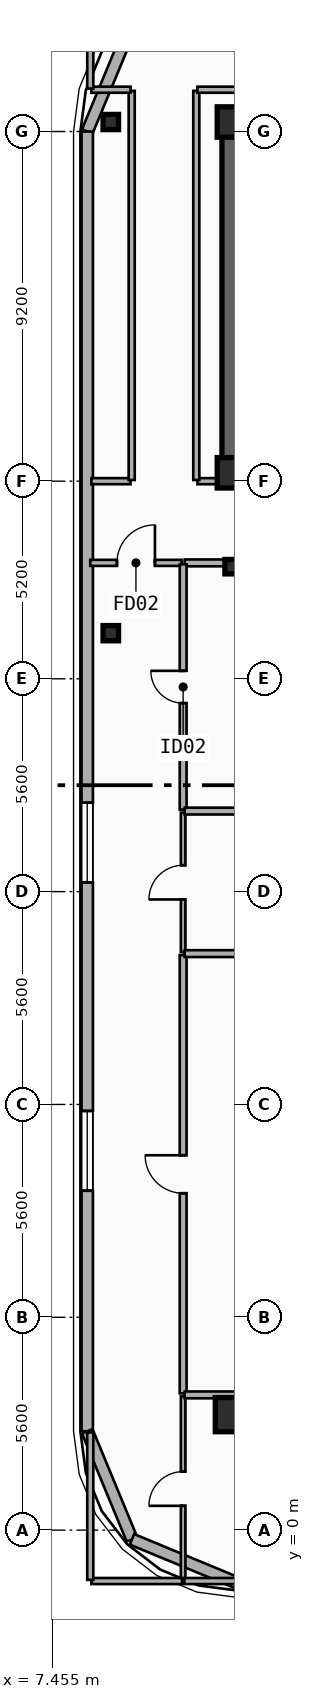
"""IFC4 building model, lengths in metres.
Left out: names, types, materials, properties, quantities, classifications, styles, units other than length and angle.
Written with IfcOpenShell. Run it as: python <this file> out.ifc"""

import sys

from ifc_helpers import new_model, si_unit, direction, frame, frame_2d, origin, origin_2d, place, context, subcontext, project, spatial, rectangle, i_section, extrude, element, fill, save


model = new_model("IFC4")
c1 = context("Model", 3, precision=1e-05, world=origin(), true_north=direction((0.0, 1.0)))
c2 = subcontext(c1, "Body", "Model", "MODEL_VIEW")
j1 = project(units=[si_unit("LENGTHUNIT", "METRE"), si_unit("PLANEANGLEUNIT", "RADIAN")], contexts=[c1])
p1 = place(None, origin())
s1 = spatial("IfcSite", under=j1, at=p1, CompositionType="ELEMENT")
p2 = place(p1, origin())
s2 = spatial("IfcBuilding", under=s1, at=p2, CompositionType="ELEMENT")
p3 = place(p2, frame((0.0, 0.0, 254.7)))
s3 = spatial("IfcBuildingStorey", under=s2, at=p3, CompositionType="ELEMENT", Elevation=254.7)
p4 = place(p3, frame((12.15, 37.05, 0.0), z_axis=(0.0, 0.0, 1.0), x_axis=(1.0, 0.0, 0.0)))
e1 = element("IfcWall", 1, at=p4, inside=s3, PredefinedType="SHEAR", context=c2, shape_type="SweptSolid", body=[
    extrude(rectangle(XDim=33.23, YDim=0.45, at=frame_2d((16.615, 0.0))), origin(), (0.0, 0.0, 1.0), 3.7),
])
p5 = place(p3, frame((21.18, 27.82, 0.0), z_axis=(0.0, 0.0, 1.0), x_axis=(-1.0, 0.0, 0.0)))
e2 = element("IfcWall", 2, at=p5, inside=s3, PredefinedType="SHEAR", context=c2, shape_type="SweptSolid", body=[
    extrude(rectangle(XDim=9.03, YDim=0.45, at=frame_2d((4.515, 0.0))), origin(), (0.0, 0.0, 1.0), 3.7),
])
p6 = place(p5, frame((2.68, 0.0, 0.0)))
e3 = element("IfcOpeningElement", 3, at=p6, cuts=e2, PredefinedType="OPENING", context=c2, shape_type="SweptSolid", body=[
    extrude(rectangle(XDim=1.1, YDim=2.15, at=frame_2d((0.55, 1.075))), frame((0.0, 0.235, 0.0), z_axis=(0.0, -1.0, 0.0), x_axis=(1.0, 0.0, 0.0)), (0.0, 0.0, 1.0), 0.47),
])
p7 = place(p3, frame((12.15, 28.045, 0.0), z_axis=(0.0, 0.0, 1.0), x_axis=(0.0, 1.0, 0.0)))
e4 = element("IfcWall", 4, at=p7, inside=s3, PredefinedType="SHEAR", context=c2, shape_type="SweptSolid", body=[
    extrude(rectangle(XDim=8.78, YDim=0.45, at=frame_2d((4.39, 0.0))), origin(), (0.0, 0.0, 1.0), 3.7),
])
for number, where, z_axis, x_axis in (
    (5, (12.2, 27.82, 0.0), (0.0, 0.0, 1.0), (1.0, 0.0, 0.0)),
    (6, (12.2, 37.05, 0.0), (0.0, 0.0, 1.0), (1.0, 0.0, 0.0)),
):
    element("IfcColumn", number, at=place(p3, frame(where, z_axis=z_axis, x_axis=x_axis)), inside=s3, PredefinedType="COLUMN", context=c2, shape_type="SweptSolid", body=[
        extrude(rectangle(XDim=0.8, YDim=0.8, at=origin_2d()), origin(), (0.0, 0.0, 1.0), 3.7),
    ])
p8 = place(p3, frame((12.2, 25.35, 0.0), z_axis=(0.0, 0.0, 1.0), x_axis=(1.0, 0.0, 0.0)))
e7 = element("IfcColumn", 7, at=p8, inside=s3, PredefinedType="COLUMN", context=c2, shape_type="SweptSolid", body=[
    extrude(i_section(OverallWidth=0.395, OverallDepth=0.38, WebThickness=0.019, FlangeThickness=0.03, FilletRadius=0.015, at=origin_2d()), origin(), (0.0, 0.0, 1.0), 3.7),
])
p9 = place(p3, frame((12.2, 3.147, 0.0), z_axis=(0.0, -0.090292812226, 0.995915261486), x_axis=(1.0, 0.0, 0.0)))
e8 = element("IfcColumn", 8, at=p9, inside=s3, PredefinedType="COLUMN", context=c2, shape_type="SweptSolid", body=[
    extrude(rectangle(XDim=0.9, YDim=0.9, at=origin_2d()), origin(), (0.0, 0.0, 1.0), 3.715),
])
for number, where, z_axis, x_axis in (
    (9, (9.0, 23.6, 0.0), (0.0, 0.0, 1.0), (1.0, 0.0, 0.0)),
    (10, (9.0, 37.05, 0.0), (0.0, 0.0, 1.0), (1.0, 0.0, 0.0)),
):
    element("IfcColumn", number, at=place(p3, frame(where, z_axis=z_axis, x_axis=x_axis)), inside=s3, PredefinedType="COLUMN", context=c2, shape_type="SweptSolid", body=[
        extrude(i_section(OverallWidth=0.408, OverallDepth=0.4, WebThickness=0.025, FlangeThickness=0.039, FilletRadius=0.015, at=origin_2d()), origin(), (0.0, 0.0, 1.0), 3.7),
    ])
p10 = place(p3, frame((8.38, 36.8, 0.0), z_axis=(0.0, 0.0, 1.0), x_axis=(0.382704529509, 0.923870793506, 0.0)))
e11 = element("IfcWall", 11, at=p10, inside=s3, PredefinedType="SOLIDWALL", context=c2, shape_type="SweptSolid", body=[
    extrude(rectangle(XDim=3.077, YDim=0.3, at=frame_2d((1.538, 0.0))), origin(), (0.0, 0.0, 1.0), 3.42),
])
p11 = place(p3, frame((8.38, 2.6, 0.0), z_axis=(0.0, 0.0, 1.0), x_axis=(0.0, 1.0, 0.0)))
e12 = element("IfcWall", 12, at=p11, inside=s3, PredefinedType="SOLIDWALL", context=c2, shape_type="SweptSolid", body=[
    extrude(rectangle(XDim=34.2, YDim=0.3, at=frame_2d((17.1, 0.0))), origin(), (0.0, 0.0, 1.0), 3.42),
])
p12 = place(p11, frame((6.33, 0.0, 0.75)))
e13 = element("IfcOpeningElement", 13, at=p12, cuts=e12, PredefinedType="OPENING", context=c2, shape_type="SweptSolid", body=[
    extrude(rectangle(XDim=2.1, YDim=2.1, at=frame_2d((1.05, 1.05))), frame((0.0, 0.16, 0.0), z_axis=(0.0, -1.0, 0.0), x_axis=(1.0, 0.0, 0.0)), (0.0, 0.0, 1.0), 0.32),
])
p13 = place(p11, frame((14.44, 0.0, 0.75)))
e14 = element("IfcOpeningElement", 14, at=p13, cuts=e12, PredefinedType="OPENING", context=c2, shape_type="SweptSolid", body=[
    extrude(rectangle(XDim=2.1, YDim=2.1, at=frame_2d((1.05, 1.05))), frame((0.0, 0.16, 0.0), z_axis=(0.0, -1.0, 0.0), x_axis=(1.0, 0.0, 0.0)), (0.0, 0.0, 1.0), 0.32),
])
p14 = place(p3, frame((9.557, -0.243, 0.0), z_axis=(0.0, 0.0, 1.0), x_axis=(-0.382676475685, 0.923882414032, 0.0)))
e15 = element("IfcWall", 15, at=p14, inside=s3, PredefinedType="SOLIDWALL", context=c2, shape_type="SweptSolid", body=[
    extrude(rectangle(XDim=3.077, YDim=0.3, at=frame_2d((1.539, 0.0))), origin(), (0.0, 0.0, 1.0), 3.42),
])
p15 = place(p3, frame((12.4, -1.42, 0.0), z_axis=(0.0, 0.0, 1.0), x_axis=(-0.92389884758, 0.382636798336, 0.0)))
e16 = element("IfcWall", 16, at=p15, inside=s3, PredefinedType="SOLIDWALL", context=c2, shape_type="SweptSolid", body=[
    extrude(rectangle(XDim=3.077, YDim=0.3, at=frame_2d((1.538, 0.0))), origin(), (0.0, 0.0, 1.0), 3.42),
])
p16 = place(p3, frame((8.46, 25.45, 0.0), z_axis=(0.0, 0.0, 1.0), x_axis=(1.0, 0.0, 0.0)))
e17 = element("IfcWall", 17, at=p16, inside=s3, PredefinedType="PARTITIONING", context=c2, shape_type="SweptSolid", body=[
    extrude(rectangle(XDim=2.404, YDim=0.16, at=frame_2d((1.202, 0.0))), origin(), (0.0, 0.0, 1.0), 3.42),
])
p17 = place(p16, frame((0.702, 0.0, 0.0)))
e18 = element("IfcOpeningElement", 18, at=p17, cuts=e17, PredefinedType="OPENING", context=c2, shape_type="SweptSolid", body=[
    extrude(rectangle(XDim=1.0, YDim=2.15, at=frame_2d((0.5, 1.075))), frame((0.0, 0.09, 0.0), z_axis=(0.0, -1.0, 0.0), x_axis=(1.0, 0.0, 0.0)), (0.0, 0.0, 1.0), 0.18),
])
p18 = place(p3, frame((10.944, 25.45, 0.0), z_axis=(0.0, 0.0, 1.0), x_axis=(1.0, 0.0, 0.0)))
e19 = element("IfcWall", 19, at=p18, inside=s3, PredefinedType="PLUMBINGWALL", context=c2, shape_type="SweptSolid", body=[
    extrude(rectangle(XDim=2.676, YDim=0.18, at=frame_2d((1.338, 0.0))), origin(), (0.0, 0.0, 1.0), 2.7),
])
p19 = place(p3, frame((10.904, -1.34, 0.0), z_axis=(0.0, 0.0, 1.0), x_axis=(0.0, 1.0, 0.0)))
e20 = element("IfcWall", 20, at=p19, inside=s3, PredefinedType="PARTITIONING", context=c2, shape_type="SweptSolid", body=[
    extrude(rectangle(XDim=4.858, YDim=0.12, at=frame_2d((2.429, 0.0))), origin(), (0.0, 0.0, 1.0), 3.42),
])
p20 = place(p19, frame((1.979, 0.0, 0.0)))
e21 = element("IfcOpeningElement", 21, at=p20, cuts=e20, PredefinedType="OPENING", context=c2, shape_type="SweptSolid", body=[
    extrude(rectangle(XDim=0.9, YDim=2.1, at=frame_2d((0.45, 1.05))), frame((0.0, 0.07, 0.0), z_axis=(0.0, -1.0, 0.0), x_axis=(1.0, 0.0, 0.0)), (0.0, 0.0, 1.0), 0.14),
])
p21 = place(p3, frame((10.904, 3.598, 0.0), z_axis=(0.0, 0.0, 1.0), x_axis=(0.0, 1.0, 0.0)))
e22 = element("IfcWall", 22, at=p21, inside=s3, PredefinedType="PLUMBINGWALL", context=c2, shape_type="SweptSolid", body=[
    extrude(rectangle(XDim=11.531, YDim=0.18, at=frame_2d((5.766, 0.0))), origin(), (0.0, 0.0, 1.0), 3.42),
])
p22 = place(p21, frame((5.265, 0.0, 0.0)))
e23 = element("IfcOpeningElement", 23, at=p22, cuts=e22, PredefinedType="OPENING", context=c2, shape_type="SweptSolid", body=[
    extrude(rectangle(XDim=1.0, YDim=2.15, at=frame_2d((0.5, 1.075))), frame((0.0, 0.1, 0.0), z_axis=(0.0, -1.0, 0.0), x_axis=(1.0, 0.0, 0.0)), (0.0, 0.0, 1.0), 0.2),
])
p23 = place(p3, frame((10.904, 15.209, 0.0), z_axis=(0.0, 0.0, 1.0), x_axis=(0.0, 1.0, 0.0)))
e24 = element("IfcWall", 24, at=p23, inside=s3, PredefinedType="PARTITIONING", context=c2, shape_type="SweptSolid", body=[
    extrude(rectangle(XDim=3.67, YDim=0.12, at=frame_2d((1.835, 0.0))), origin(), (0.0, 0.0, 1.0), 3.42),
])
p24 = place(p23, frame((1.385, 0.0, 0.0)))
e25 = element("IfcOpeningElement", 25, at=p24, cuts=e24, PredefinedType="OPENING", context=c2, shape_type="SweptSolid", body=[
    extrude(rectangle(XDim=0.9, YDim=2.1, at=frame_2d((0.45, 1.05))), frame((0.0, 0.07, 0.0), z_axis=(0.0, -1.0, 0.0), x_axis=(1.0, 0.0, 0.0)), (0.0, 0.0, 1.0), 0.14),
])
p25 = place(p3, frame((10.904, 18.959, 0.0), z_axis=(0.0, 0.0, 1.0), x_axis=(0.0, 1.0, 0.0)))
e26 = element("IfcWall", 26, at=p25, inside=s3, PredefinedType="PLUMBINGWALL", context=c2, shape_type="SweptSolid", body=[
    extrude(rectangle(XDim=6.451, YDim=0.18, at=frame_2d((3.226, 0.0))), origin(), (0.0, 0.0, 1.0), 2.9),
])
p26 = place(p25, frame((2.801, 0.0, 0.0)))
e27 = element("IfcOpeningElement", 27, at=p26, cuts=e26, PredefinedType="OPENING", context=c2, shape_type="SweptSolid", body=[
    extrude(rectangle(XDim=0.85, YDim=2.1, at=frame_2d((0.425, 1.05))), frame((0.0, 0.1, 0.0), z_axis=(0.0, -1.0, 0.0), x_axis=(1.0, 0.0, 0.0)), (0.0, 0.0, 1.0), 0.2),
])
for number, where, z_axis, x_axis in (
    (28, (10.944, 3.558, 0.0), (0.0, 0.0, 1.0), (1.0, 0.0, 0.0)),
    (29, (10.944, 15.169, 0.0), (0.0, 0.0, 1.0), (1.0, 0.0, 0.0)),
    (30, (10.944, 18.919, 0.0), (0.0, 0.0, 1.0), (1.0, 0.0, 0.0)),
):
    element("IfcWall", number, at=place(p3, frame(where, z_axis=z_axis, x_axis=x_axis)), inside=s3, PredefinedType="PLUMBINGWALL", context=c2, shape_type="SweptSolid", body=[
        extrude(rectangle(XDim=2.676, YDim=0.18, at=frame_2d((1.338, 0.0))), origin(), (0.0, 0.0, 1.0), 2.7),
    ])
p27 = place(p3, frame((8.49, 27.6, 0.0), z_axis=(0.0, 0.0, 1.0), x_axis=(1.0, 0.0, 0.0)))
e31 = element("IfcWall", 31, at=p27, inside=s3, PredefinedType="PARTITIONING", context=c2, shape_type="SweptSolid", body=[
    extrude(rectangle(XDim=1.03, YDim=0.16, at=frame_2d((0.515, 0.0))), origin(), (0.0, 0.0, 1.0), 3.42),
])
p28 = place(p3, frame((11.28, 27.6, 0.0), z_axis=(0.0, 0.0, 1.0), x_axis=(1.0, 0.0, 0.0)))
e32 = element("IfcWall", 32, at=p28, inside=s3, PredefinedType="PARTITIONING", context=c2, shape_type="SweptSolid", body=[
    extrude(rectangle(XDim=0.84, YDim=0.16, at=frame_2d((0.42, 0.0))), origin(), (0.0, 0.0, 1.0), 2.49),
])
for number, where, z_axis, x_axis in (
    (33, (9.55, 27.63, 0.0), (0.0, 0.0, 1.0), (0.0, 1.0, 0.0)),
    (34, (11.25, 27.63, 0.0), (0.0, 0.0, 1.0), (0.0, 1.0, 0.0)),
):
    element("IfcWall", number, at=place(p3, frame(where, z_axis=z_axis, x_axis=x_axis)), inside=s3, PredefinedType="PARTITIONING", context=c2, shape_type="SweptSolid", body=[
        extrude(rectangle(XDim=10.24, YDim=0.16, at=frame_2d((5.12, 0.0))), origin(), (0.0, 0.0, 1.0), 2.9),
    ])
p29 = place(p3, frame((8.49, 37.9, 0.0), z_axis=(0.0, 0.0, 1.0), x_axis=(1.0, 0.0, 0.0)))
e35 = element("IfcWall", 35, at=p29, inside=s3, PredefinedType="PARTITIONING", context=c2, shape_type="SweptSolid", body=[
    extrude(rectangle(XDim=1.03, YDim=0.16, at=frame_2d((0.515, 0.0))), origin(), (0.0, 0.0, 1.0), 3.42),
])
p30 = place(p3, frame((11.28, 37.9, 0.0), z_axis=(0.0, 0.0, 1.0), x_axis=(1.0, 0.0, 0.0)))
e36 = element("IfcWall", 36, at=p30, inside=s3, PredefinedType="PARTITIONING", context=c2, shape_type="SweptSolid", body=[
    extrude(rectangle(XDim=35.04, YDim=0.16, at=frame_2d((17.52, 0.0))), origin(), (0.0, 0.0, 1.0), 3.42),
])
p31 = place(p3, frame((8.46, 37.93, 0.0), z_axis=(0.0, 0.0, 1.0), x_axis=(0.0, 1.0, 0.0)))
e37 = element("IfcWall", 37, at=p31, inside=s3, PredefinedType="PARTITIONING", context=c2, shape_type="SweptSolid", body=[
    extrude(rectangle(XDim=1.44, YDim=0.16, at=frame_2d((0.72, 0.0))), origin(), (0.0, 0.0, 1.0), 3.42),
])
p32 = place(p3, frame((8.49, -1.34, 0.0), z_axis=(0.0, 0.0, 1.0), x_axis=(1.0, 0.0, 0.0)))
e38 = element("IfcWall", 38, at=p32, inside=s3, PredefinedType="PARTITIONING", context=c2, shape_type="SweptSolid", body=[
    extrude(rectangle(XDim=2.384, YDim=0.16, at=frame_2d((1.192, 0.0))), origin(), (0.0, 0.0, 1.0), 3.42),
])
p33 = place(p3, frame((8.46, -1.31, 0.0), z_axis=(0.0, 0.0, 1.0), x_axis=(0.0, 1.0, 0.0)))
e39 = element("IfcWall", 39, at=p33, inside=s3, PredefinedType="PARTITIONING", context=c2, shape_type="SweptSolid", body=[
    extrude(rectangle(XDim=3.88, YDim=0.16, at=frame_2d((1.94, 0.0))), origin(), (0.0, 0.0, 1.0), 3.42),
])
p34 = place(p3, frame((10.934, -1.34, 0.0), z_axis=(0.0, 0.0, 1.0), x_axis=(1.0, 0.0, 0.0)))
e40 = element("IfcWall", 40, at=p34, inside=s3, PredefinedType="PARTITIONING", context=c2, shape_type="SweptSolid", body=[
    extrude(rectangle(XDim=1.436, YDim=0.16, at=frame_2d((0.718, 0.0))), origin(), (0.0, 0.0, 1.0), 3.42),
])
p35 = place(p12, origin())
e41 = element("IfcWindow", 41, at=p35, inside=s3, PartitioningType="SINGLE_PANEL", PredefinedType="WINDOW", context=c2, shape_type="SweptSolid", body=[
    extrude(rectangle(XDim=2.1, YDim=2.1, at=frame_2d((1.05, 1.05))), frame((0.0, 0.03, 0.0), z_axis=(0.0, -1.0, 0.0), x_axis=(1.0, 0.0, 0.0)), (0.0, 0.0, 1.0), 0.06),
])
fill(e13, e41)
p36 = place(p13, origin())
e42 = element("IfcWindow", 42, at=p36, inside=s3, PartitioningType="SINGLE_PANEL", PredefinedType="WINDOW", context=c2, shape_type="SweptSolid", body=[
    extrude(rectangle(XDim=2.1, YDim=2.1, at=frame_2d((1.05, 1.05))), frame((0.0, 0.03, 0.0), z_axis=(0.0, -1.0, 0.0), x_axis=(1.0, 0.0, 0.0)), (0.0, 0.0, 1.0), 0.06),
])
fill(e14, e42)
p37 = place(p17, origin())
e43 = element("IfcDoor", 43, at=p37, inside=s3, OperationType="SINGLE_SWING_RIGHT", PredefinedType="DOOR", context=c2, shape_type="SweptSolid", body=[
    extrude(rectangle(XDim=1.0, YDim=2.15, at=frame_2d((0.5, 1.075))), frame((0.0, 0.025, 0.0), z_axis=(0.0, -1.0, 0.0), x_axis=(1.0, 0.0, 0.0)), (0.0, 0.0, 1.0), 0.05),
])
fill(e18, e43)
p38 = place(p20, origin())
e44 = element("IfcDoor", 44, at=p38, inside=s3, OperationType="SINGLE_SWING_LEFT", PredefinedType="DOOR", context=c2, shape_type="SweptSolid", body=[
    extrude(rectangle(XDim=0.9, YDim=2.1, at=frame_2d((0.45, 1.05))), frame((0.0, 0.025, 0.0), z_axis=(0.0, -1.0, 0.0), x_axis=(1.0, 0.0, 0.0)), (0.0, 0.0, 1.0), 0.05),
])
fill(e21, e44)
p39 = place(p22, origin())
e45 = element("IfcDoor", 45, at=p39, inside=s3, OperationType="SINGLE_SWING_RIGHT", PredefinedType="DOOR", context=c2, shape_type="SweptSolid", body=[
    extrude(rectangle(XDim=1.0, YDim=2.15, at=frame_2d((0.5, 1.075))), frame((0.0, 0.025, 0.0), z_axis=(0.0, -1.0, 0.0), x_axis=(1.0, 0.0, 0.0)), (0.0, 0.0, 1.0), 0.05),
])
fill(e23, e45)
p40 = place(p24, origin())
e46 = element("IfcDoor", 46, at=p40, inside=s3, OperationType="SINGLE_SWING_LEFT", PredefinedType="DOOR", context=c2, shape_type="SweptSolid", body=[
    extrude(rectangle(XDim=0.9, YDim=2.1, at=frame_2d((0.45, 1.05))), frame((0.0, 0.025, 0.0), z_axis=(0.0, -1.0, 0.0), x_axis=(1.0, 0.0, 0.0)), (0.0, 0.0, 1.0), 0.05),
])
fill(e25, e46)
p41 = place(p26, origin())
e47 = element("IfcDoor", 47, at=p41, inside=s3, OperationType="SINGLE_SWING_RIGHT", PredefinedType="DOOR", context=c2, shape_type="SweptSolid", body=[
    extrude(rectangle(XDim=0.85, YDim=2.1, at=frame_2d((0.425, 1.05))), frame((0.0, 0.025, 0.0), z_axis=(0.0, -1.0, 0.0), x_axis=(1.0, 0.0, 0.0)), (0.0, 0.0, 1.0), 0.05),
])
fill(e27, e47)
save(model, sys.argv[1])
